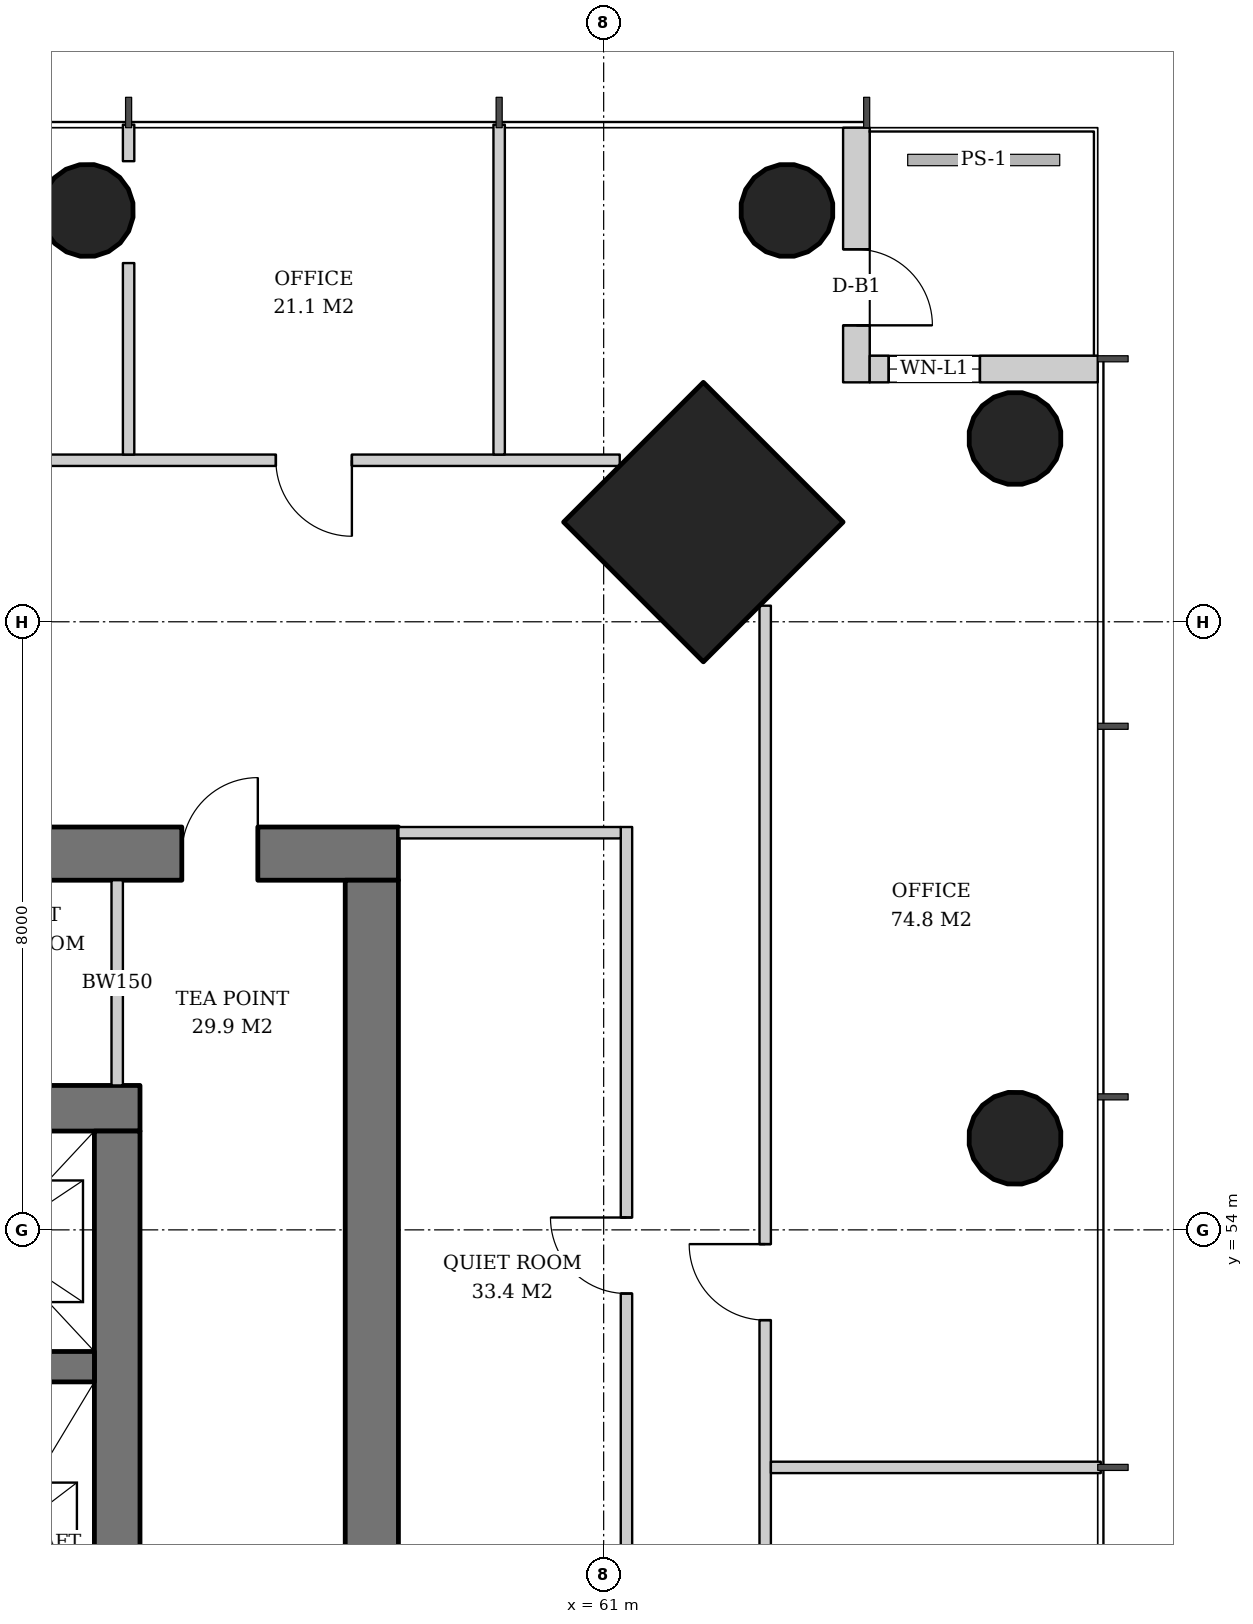
"""IFC4 building model, lengths in metres.
Left out: names, types, materials, properties, quantities, classifications, styles, units other than length and angle.
Written with IfcOpenShell. Run it as: python <this file> out.ifc"""

import sys

from ifc_helpers import new_model, si_unit, direction, frame, frame_2d, origin, origin_2d, place, context, subcontext, project, spatial, rectangle, hollow_circle, extrude, element, fill, save


model = new_model("IFC4")
c1 = context("Model", 3, precision=1e-05, world=origin(), true_north=direction((0.0, 1.0)))
c2 = subcontext(c1, "Body", "Model", "MODEL_VIEW")
j1 = project(units=[si_unit("LENGTHUNIT", "METRE"), si_unit("PLANEANGLEUNIT", "RADIAN")], contexts=[c1])
p1 = place(None, origin())
s1 = spatial("IfcSite", under=j1, at=p1, CompositionType="ELEMENT")
p2 = place(p1, origin())
s2 = spatial("IfcBuilding", under=s1, at=p2, CompositionType="ELEMENT")
p3 = place(p2, frame((0.0, 0.0, 100.8)))
s3 = spatial("IfcBuildingStorey", under=s2, at=p3, CompositionType="ELEMENT", Elevation=100.8)
p4 = place(p3, frame((62.35, 63.35, 0.0), z_axis=(-0.031962158256, -0.031962158256, 0.998977898093), x_axis=(0.707106781187, -0.707106781187, 0.0)))
e1 = element("IfcColumn", 1, at=p4, inside=s3, PredefinedType="COLUMN", context=c2, shape_type="SweptSolid", body=[
    extrude(rectangle(XDim=2.6, YDim=2.6, at=origin_2d()), origin(), (0.0, 0.0, 1.0), 3.804),
])
p5 = place(p3, frame((66.45, 64.45, 0.0), z_axis=(-0.031898107953, -0.031898107953, 0.998981992539), x_axis=(0.707106781187, -0.707106781187, 0.0)))
e2 = element("IfcColumn", 2, at=p5, inside=s3, PredefinedType="COLUMN", context=c2, shape_type="SweptSolid", body=[
    extrude(hollow_circle(Radius=0.61, WallThickness=0.04, at=origin_2d()), origin(), (0.0, 0.0, 1.0), 3.804),
])
p6 = place(p3, frame((66.45, 55.225, 0.0), z_axis=(-0.031910269556, -0.015987237665, 0.999362868496), x_axis=(0.447933021895, -0.894067115991, 0.0)))
e3 = element("IfcColumn", 3, at=p6, inside=s3, PredefinedType="COLUMN", context=c2, shape_type="SweptSolid", body=[
    extrude(hollow_circle(Radius=0.61, WallThickness=0.04, at=origin_2d()), origin(), (0.0, 0.0, 1.0), 3.802),
])
p7 = place(p3, frame((63.45, 67.45, 0.0), z_axis=(-0.031898107953, -0.031898107953, 0.998981992539), x_axis=(0.707106781187, -0.707106781187, 0.0)))
e4 = element("IfcColumn", 4, at=p7, inside=s3, PredefinedType="COLUMN", context=c2, shape_type="SweptSolid", body=[
    extrude(hollow_circle(Radius=0.61, WallThickness=0.04, at=origin_2d()), origin(), (0.0, 0.0, 1.0), 3.804),
])
p8 = place(p3, frame((54.225, 67.45, 0.0), z_axis=(-0.015987237665, -0.031910269556, 0.999362868496), x_axis=(0.894067115991, -0.447933021895, 0.0)))
e5 = element("IfcColumn", 5, at=p8, inside=s3, PredefinedType="COLUMN", context=c2, shape_type="SweptSolid", body=[
    extrude(hollow_circle(Radius=0.61, WallThickness=0.04, at=origin_2d()), origin(), (0.0, 0.0, 1.0), 3.802),
])
p9 = place(p3, frame((35.1, 55.6, 0.0), z_axis=(0.0, 0.0, 1.0), x_axis=(1.0, 0.0, 0.0)))
e6 = element("IfcWall", 6, at=p9, inside=s3, PredefinedType="SHEAR", context=c2, shape_type="SweptSolid", body=[
    extrude(rectangle(XDim=19.8, YDim=0.6, at=frame_2d((9.9, 0.0))), origin(), (0.0, 0.0, 1.0), 3.8),
])
p10 = place(p9, frame((14.54, 0.0, 0.0)))
e7 = element("IfcOpeningElement", 7, at=p10, cuts=e6, PredefinedType="OPENING", context=c2, shape_type="SweptSolid", body=[
    extrude(rectangle(XDim=1.0, YDim=2.1, at=frame_2d((0.5, 1.05))), frame((0.0, 0.31, 0.0), z_axis=(0.0, -1.0, 0.0), x_axis=(1.0, 0.0, 0.0)), (0.0, 0.0, 1.0), 0.62),
])
p11 = place(p9, frame((2.425, 0.0, 0.0)))
e8 = element("IfcOpeningElement", 8, at=p11, cuts=e6, PredefinedType="OPENING", context=c2, shape_type="SweptSolid", body=[
    extrude(rectangle(XDim=1.0, YDim=2.1, at=frame_2d((0.5, 1.05))), frame((0.0, 0.31, 0.0), z_axis=(0.0, -1.0, 0.0), x_axis=(1.0, 0.0, 0.0)), (0.0, 0.0, 1.0), 0.62),
])
p12 = place(p3, frame((54.6, 36.7, 0.0), z_axis=(0.0, 0.0, 1.0), x_axis=(0.0, 1.0, 0.0)))
e9 = element("IfcWall", 9, at=p12, inside=s3, PredefinedType="SHEAR", context=c2, shape_type="SweptSolid", body=[
    extrude(rectangle(XDim=18.6, YDim=0.6, at=frame_2d((9.3, 0.0))), origin(), (0.0, 0.0, 1.0), 3.8),
])
p13 = place(p12, frame((8.4, 0.0, 0.0)))
e10 = element("IfcOpeningElement", 10, at=p13, cuts=e9, PredefinedType="OPENING", context=c2, shape_type="SweptSolid", body=[
    extrude(rectangle(XDim=1.8, YDim=2.4, at=frame_2d((0.9, 1.2))), frame((0.0, 0.31, 0.0), z_axis=(0.0, -1.0, 0.0), x_axis=(1.0, 0.0, 0.0)), (0.0, 0.0, 1.0), 0.62),
])
p14 = place(p3, frame((31.7, 58.95, 0.0), z_axis=(0.0, 0.0, 1.0), x_axis=(1.0, 0.0, 0.0)))
e11 = element("IfcWall", 11, at=p14, inside=s3, PredefinedType="SHEAR", context=c2, shape_type="SweptSolid", body=[
    extrude(rectangle(XDim=26.6, YDim=0.7, at=frame_2d((13.3, 0.0))), origin(), (0.0, 0.0, 1.0), 3.8),
])
p15 = place(p14, frame((17.94, 0.0, 0.0)))
e12 = element("IfcOpeningElement", 12, at=p15, cuts=e11, PredefinedType="OPENING", context=c2, shape_type="SweptSolid", body=[
    extrude(rectangle(XDim=1.0, YDim=2.1, at=frame_2d((0.5, 1.05))), frame((0.0, 0.36, 0.0), z_axis=(0.0, -1.0, 0.0), x_axis=(1.0, 0.0, 0.0)), (0.0, 0.0, 1.0), 0.72),
])
p16 = place(p14, frame((5.825, 0.0, 0.0)))
e13 = element("IfcOpeningElement", 13, at=p16, cuts=e11, PredefinedType="OPENING", context=c2, shape_type="SweptSolid", body=[
    extrude(rectangle(XDim=1.0, YDim=2.1, at=frame_2d((0.5, 1.05))), frame((0.0, 0.36, 0.0), z_axis=(0.0, -1.0, 0.0), x_axis=(1.0, 0.0, 0.0)), (0.0, 0.0, 1.0), 0.72),
])
p17 = place(p14, frame((1.169, 0.0, 0.0)))
e14 = element("IfcOpeningElement", 14, at=p17, cuts=e11, PredefinedType="OPENING", context=c2, shape_type="SweptSolid", body=[
    extrude(rectangle(XDim=1.0, YDim=2.1, at=frame_2d((0.5, 1.05))), frame((0.0, 0.36, 0.0), z_axis=(0.0, -1.0, 0.0), x_axis=(1.0, 0.0, 0.0)), (0.0, 0.0, 1.0), 0.72),
])
p18 = place(p14, frame((3.447, 0.0, 0.0)))
e15 = element("IfcOpeningElement", 15, at=p18, cuts=e11, PredefinedType="OPENING", context=c2, shape_type="SweptSolid", body=[
    extrude(rectangle(XDim=1.0, YDim=2.1, at=frame_2d((0.5, 1.05))), frame((0.0, 0.36, 0.0), z_axis=(0.0, -1.0, 0.0), x_axis=(1.0, 0.0, 0.0)), (0.0, 0.0, 1.0), 0.72),
])
p19 = place(p14, frame((11.577, 0.0, 0.0)))
e16 = element("IfcOpeningElement", 16, at=p19, cuts=e11, PredefinedType="OPENING", context=c2, shape_type="SweptSolid", body=[
    extrude(rectangle(XDim=1.0, YDim=2.1, at=frame_2d((0.5, 1.05))), frame((0.0, 0.36, 0.0), z_axis=(0.0, -1.0, 0.0), x_axis=(1.0, 0.0, 0.0)), (0.0, 0.0, 1.0), 0.72),
])
p20 = place(p14, frame((20.9, 0.0, 0.0)))
e17 = element("IfcOpeningElement", 17, at=p20, cuts=e11, PredefinedType="OPENING", context=c2, shape_type="SweptSolid", body=[
    extrude(rectangle(XDim=1.0, YDim=2.1, at=frame_2d((0.5, 1.05))), frame((0.0, 0.36, 0.0), z_axis=(0.0, -1.0, 0.0), x_axis=(1.0, 0.0, 0.0)), (0.0, 0.0, 1.0), 0.72),
])
p21 = place(p14, frame((23.75, 0.0, 0.0)))
e18 = element("IfcOpeningElement", 18, at=p21, cuts=e11, PredefinedType="OPENING", context=c2, shape_type="SweptSolid", body=[
    extrude(rectangle(XDim=1.0, YDim=2.1, at=frame_2d((0.5, 1.05))), frame((0.0, 0.36, 0.0), z_axis=(0.0, -1.0, 0.0), x_axis=(1.0, 0.0, 0.0)), (0.0, 0.0, 1.0), 0.72),
])
p22 = place(p3, frame((57.95, 33.4, 0.0), z_axis=(0.0, 0.0, 1.0), x_axis=(0.0, 1.0, 0.0)))
e19 = element("IfcWall", 19, at=p22, inside=s3, PredefinedType="SHEAR", context=c2, shape_type="SweptSolid", body=[
    extrude(rectangle(XDim=25.2, YDim=0.7, at=frame_2d((12.6, 0.0))), origin(), (0.0, 0.0, 1.0), 3.8),
])
p23 = place(p22, frame((11.7, 0.0, 0.0)))
e20 = element("IfcOpeningElement", 20, at=p23, cuts=e19, PredefinedType="OPENING", context=c2, shape_type="SweptSolid", body=[
    extrude(rectangle(XDim=1.8, YDim=2.4, at=frame_2d((0.9, 1.2))), frame((0.0, 0.36, 0.0), z_axis=(0.0, -1.0, 0.0), x_axis=(1.0, 0.0, 0.0)), (0.0, 0.0, 1.0), 0.72),
])
p24 = place(p3, frame((35.7, 52.2, 0.0), z_axis=(0.0, 0.0, 1.0), x_axis=(1.0, 0.0, 0.0)))
e21 = element("IfcWall", 21, at=p24, inside=s3, PredefinedType="SHEAR", context=c2, shape_type="SweptSolid", body=[
    extrude(rectangle(XDim=18.6, YDim=0.4, at=frame_2d((9.3, 0.0))), origin(), (0.0, 0.0, 1.0), 3.8),
])
p25 = place(p3, frame((64.325, 68.5, 0.0), z_axis=(0.0, 0.0, 1.0), x_axis=(0.0, -1.0, 0.0)))
e22 = element("IfcWall", 22, at=p25, inside=s3, PredefinedType="SOLIDWALL", context=c2, shape_type="SweptSolid", body=[
    extrude(rectangle(XDim=3.35, YDim=0.35, at=frame_2d((1.675, 0.0))), origin(), (0.0, 0.0, 1.0), 3.62),
])
p26 = place(p25, frame((1.6, 0.0, 0.0)))
e23 = element("IfcOpeningElement", 23, at=p26, cuts=e22, PredefinedType="OPENING", context=c2, shape_type="SweptSolid", body=[
    extrude(rectangle(XDim=1.0, YDim=2.4, at=frame_2d((0.5, 1.2))), frame((0.0, 0.185, 0.0), z_axis=(0.0, -1.0, 0.0), x_axis=(1.0, 0.0, 0.0)), (0.0, 0.0, 1.0), 0.37),
])
p27 = place(p3, frame((64.5, 65.325, 0.0), z_axis=(0.0, 0.0, 1.0), x_axis=(1.0, 0.0, 0.0)))
e24 = element("IfcWall", 24, at=p27, inside=s3, PredefinedType="SOLIDWALL", context=c2, shape_type="SweptSolid", body=[
    extrude(rectangle(XDim=3.0, YDim=0.35, at=frame_2d((1.5, 0.0))), origin(), (0.0, 0.0, 1.0), 3.62),
])
p28 = place(p27, frame((0.25, 0.0, 0.6)))
e25 = element("IfcOpeningElement", 25, at=p28, cuts=e24, PredefinedType="OPENING", context=c2, shape_type="SweptSolid", body=[
    extrude(rectangle(XDim=1.2, YDim=2.55, at=frame_2d((0.6, 1.275))), frame((0.0, 0.185, 0.0), z_axis=(0.0, -1.0, 0.0), x_axis=(1.0, 0.0, 0.0)), (0.0, 0.0, 1.0), 0.37),
])
p29 = place(p3, frame((54.6, 55.9, 0.0), z_axis=(0.0, 0.0, 1.0), x_axis=(0.0, 1.0, 0.0)))
e26 = element("IfcWall", 26, at=p29, inside=s3, PredefinedType="SOLIDWALL", context=c2, shape_type="SweptSolid", body=[
    extrude(rectangle(XDim=2.7, YDim=0.15, at=frame_2d((1.35, 0.0))), origin(), (0.0, 0.0, 1.0), 3.62),
])
p30 = place(p3, frame((61.3, 48.025, 0.0), z_axis=(0.0, 0.0, 1.0), x_axis=(0.0, 1.0, 0.0)))
e27 = element("IfcWall", 27, at=p30, inside=s3, PredefinedType="PARTITIONING", context=c2, shape_type="SweptSolid", body=[
    extrude(rectangle(XDim=11.275, YDim=0.15, at=frame_2d((5.638, 0.0))), origin(), (0.0, 0.0, 1.0), 2.806),
])
p31 = place(p30, frame((5.137, 0.0, 0.0)))
e28 = element("IfcOpeningElement", 28, at=p31, cuts=e27, PredefinedType="OPENING", context=c2, shape_type="SweptSolid", body=[
    extrude(rectangle(XDim=1.0, YDim=2.1, at=frame_2d((0.5, 1.05))), frame((0.0, 0.085, 0.0), z_axis=(0.0, -1.0, 0.0), x_axis=(1.0, 0.0, 0.0)), (0.0, 0.0, 1.0), 0.17),
])
p32 = place(p3, frame((58.3, 59.225, 0.0), z_axis=(0.0, 0.0, 1.0), x_axis=(1.0, 0.0, 0.0)))
e29 = element("IfcWall", 29, at=p32, inside=s3, PredefinedType="PARTITIONING", context=c2, shape_type="SweptSolid", body=[
    extrude(rectangle(XDim=2.925, YDim=0.15, at=frame_2d((1.462, 0.0))), origin(), (0.0, 0.0, 1.0), 3.62),
])
p33 = place(p3, frame((63.125, 29.789, 0.0), z_axis=(0.0, 0.0, 1.0), x_axis=(0.0, 1.0, 0.0)))
e30 = element("IfcWall", 30, at=p33, inside=s3, PredefinedType="PARTITIONING", context=c2, shape_type="SweptSolid", body=[
    extrude(rectangle(XDim=32.423, YDim=0.15, at=frame_2d((16.211, 0.0))), origin(), (0.0, 0.0, 1.0), 2.72),
])
p34 = place(p33, frame((3.524, 0.0, 0.0)))
e31 = element("IfcOpeningElement", 31, at=p34, cuts=e30, PredefinedType="OPENING", context=c2, shape_type="SweptSolid", body=[
    extrude(rectangle(XDim=1.0, YDim=2.1, at=frame_2d((0.5, 1.05))), frame((0.0, 0.085, 0.0), z_axis=(0.0, -1.0, 0.0), x_axis=(1.0, 0.0, 0.0)), (0.0, 0.0, 1.0), 0.17),
])
p35 = place(p33, frame((8.399, 0.0, 0.0)))
e32 = element("IfcOpeningElement", 32, at=p35, cuts=e30, PredefinedType="OPENING", context=c2, shape_type="SweptSolid", body=[
    extrude(rectangle(XDim=1.0, YDim=2.1, at=frame_2d((0.5, 1.05))), frame((0.0, 0.085, 0.0), z_axis=(0.0, -1.0, 0.0), x_axis=(1.0, 0.0, 0.0)), (0.0, 0.0, 1.0), 0.17),
])
p36 = place(p33, frame((13.274, 0.0, 0.0)))
e33 = element("IfcOpeningElement", 33, at=p36, cuts=e30, PredefinedType="OPENING", context=c2, shape_type="SweptSolid", body=[
    extrude(rectangle(XDim=1.0, YDim=2.1, at=frame_2d((0.5, 1.05))), frame((0.0, 0.085, 0.0), z_axis=(0.0, -1.0, 0.0), x_axis=(1.0, 0.0, 0.0)), (0.0, 0.0, 1.0), 0.17),
])
p37 = place(p33, frame((18.149, 0.0, 0.0)))
e34 = element("IfcOpeningElement", 34, at=p37, cuts=e30, PredefinedType="OPENING", context=c2, shape_type="SweptSolid", body=[
    extrude(rectangle(XDim=1.0, YDim=2.1, at=frame_2d((0.5, 1.05))), frame((0.0, 0.085, 0.0), z_axis=(0.0, -1.0, 0.0), x_axis=(1.0, 0.0, 0.0)), (0.0, 0.0, 1.0), 0.17),
])
p38 = place(p33, frame((23.024, 0.0, 0.0)))
e35 = element("IfcOpeningElement", 35, at=p38, cuts=e30, PredefinedType="OPENING", context=c2, shape_type="SweptSolid", body=[
    extrude(rectangle(XDim=1.0, YDim=2.1, at=frame_2d((0.5, 1.05))), frame((0.0, 0.085, 0.0), z_axis=(0.0, -1.0, 0.0), x_axis=(1.0, 0.0, 0.0)), (0.0, 0.0, 1.0), 0.17),
])
p39 = place(p3, frame((63.2, 50.875, 0.0), z_axis=(0.0, 0.0, 1.0), x_axis=(1.0, 0.0, 0.0)))
e36 = element("IfcWall", 36, at=p39, inside=s3, PredefinedType="PARTITIONING", context=c2, shape_type="SweptSolid", body=[
    extrude(rectangle(XDim=4.34, YDim=0.15, at=frame_2d((2.17, 0.0))), origin(), (0.0, 0.0, 1.0), 2.82),
])
p40 = place(p3, frame((61.211, 64.125, 0.0), z_axis=(0.0, 0.0, 1.0), x_axis=(-1.0, 0.0, 0.0)))
e37 = element("IfcWall", 37, at=p40, inside=s3, PredefinedType="PARTITIONING", context=c2, shape_type="SweptSolid", body=[
    extrude(rectangle(XDim=32.423, YDim=0.15, at=frame_2d((16.211, 0.0))), origin(), (0.0, 0.0, 1.0), 2.72),
])
p41 = place(p40, frame((3.524, 0.0, 0.0)))
e38 = element("IfcOpeningElement", 38, at=p41, cuts=e37, PredefinedType="OPENING", context=c2, shape_type="SweptSolid", body=[
    extrude(rectangle(XDim=1.0, YDim=2.1, at=frame_2d((0.5, 1.05))), frame((0.0, 0.085, 0.0), z_axis=(0.0, -1.0, 0.0), x_axis=(1.0, 0.0, 0.0)), (0.0, 0.0, 1.0), 0.17),
])
p42 = place(p40, frame((8.399, 0.0, 0.0)))
e39 = element("IfcOpeningElement", 39, at=p42, cuts=e37, PredefinedType="OPENING", context=c2, shape_type="SweptSolid", body=[
    extrude(rectangle(XDim=1.0, YDim=2.1, at=frame_2d((0.5, 1.05))), frame((0.0, 0.085, 0.0), z_axis=(0.0, -1.0, 0.0), x_axis=(1.0, 0.0, 0.0)), (0.0, 0.0, 1.0), 0.17),
])
p43 = place(p40, frame((13.274, 0.0, 0.0)))
e40 = element("IfcOpeningElement", 40, at=p43, cuts=e37, PredefinedType="OPENING", context=c2, shape_type="SweptSolid", body=[
    extrude(rectangle(XDim=1.0, YDim=2.1, at=frame_2d((0.5, 1.05))), frame((0.0, 0.085, 0.0), z_axis=(0.0, -1.0, 0.0), x_axis=(1.0, 0.0, 0.0)), (0.0, 0.0, 1.0), 0.17),
])
p44 = place(p40, frame((18.149, 0.0, 0.0)))
e41 = element("IfcOpeningElement", 41, at=p44, cuts=e37, PredefinedType="OPENING", context=c2, shape_type="SweptSolid", body=[
    extrude(rectangle(XDim=1.0, YDim=2.1, at=frame_2d((0.5, 1.05))), frame((0.0, 0.085, 0.0), z_axis=(0.0, -1.0, 0.0), x_axis=(1.0, 0.0, 0.0)), (0.0, 0.0, 1.0), 0.17),
])
p45 = place(p40, frame((23.024, 0.0, 0.0)))
e42 = element("IfcOpeningElement", 42, at=p45, cuts=e37, PredefinedType="OPENING", context=c2, shape_type="SweptSolid", body=[
    extrude(rectangle(XDim=1.0, YDim=2.1, at=frame_2d((0.5, 1.05))), frame((0.0, 0.085, 0.0), z_axis=(0.0, -1.0, 0.0), x_axis=(1.0, 0.0, 0.0)), (0.0, 0.0, 1.0), 0.17),
])
p46 = place(p40, frame((27.899, 0.0, 0.0)))
e43 = element("IfcOpeningElement", 43, at=p46, cuts=e37, PredefinedType="OPENING", context=c2, shape_type="SweptSolid", body=[
    extrude(rectangle(XDim=1.0, YDim=2.1, at=frame_2d((0.5, 1.05))), frame((0.0, 0.085, 0.0), z_axis=(0.0, -1.0, 0.0), x_axis=(1.0, 0.0, 0.0)), (0.0, 0.0, 1.0), 0.17),
])
p47 = place(p3, frame((59.625, 64.2, 0.0), z_axis=(0.0, 0.0, 1.0), x_axis=(0.0, 1.0, 0.0)))
e44 = element("IfcWall", 44, at=p47, inside=s3, PredefinedType="PARTITIONING", context=c2, shape_type="SweptSolid", body=[
    extrude(rectangle(XDim=4.34, YDim=0.15, at=frame_2d((2.17, 0.0))), origin(), (0.0, 0.0, 1.0), 2.82),
])
p48 = place(p3, frame((54.75, 64.2, 0.0), z_axis=(0.0, 0.0, 1.0), x_axis=(0.0, 1.0, 0.0)))
e45 = element("IfcWall", 45, at=p48, inside=s3, PredefinedType="PARTITIONING", context=c2, shape_type="SweptSolid", body=[
    extrude(rectangle(XDim=2.519, YDim=0.15, at=frame_2d((1.26, 0.0))), origin(), (0.0, 0.0, 1.0), 3.62),
])
p49 = place(p3, frame((54.75, 68.06, 0.0), z_axis=(0.0, 0.0, 1.0), x_axis=(0.0, 1.0, 0.0)))
e46 = element("IfcWall", 46, at=p49, inside=s3, PredefinedType="PARTITIONING", context=c2, shape_type="SweptSolid", body=[
    extrude(rectangle(XDim=0.48, YDim=0.15, at=frame_2d((0.24, 0.0))), origin(), (0.0, 0.0, 1.0), 3.62),
])
p50 = place(p26, origin())
e47 = element("IfcDoor", 47, at=p50, inside=s3, OperationType="SINGLE_SWING_RIGHT", PredefinedType="DOOR", context=c2, shape_type="SweptSolid", body=[
    extrude(rectangle(XDim=1.0, YDim=2.4, at=frame_2d((0.5, 1.2))), frame((0.0, 0.025, 0.0), z_axis=(0.0, -1.0, 0.0), x_axis=(1.0, 0.0, 0.0)), (0.0, 0.0, 1.0), 0.05),
])
fill(e23, e47)
p51 = place(p28, origin())
e48 = element("IfcWindow", 48, at=p51, inside=s3, PartitioningType="SINGLE_PANEL", PredefinedType="WINDOW", context=c2, shape_type="SweptSolid", body=[
    extrude(rectangle(XDim=1.2, YDim=2.55, at=frame_2d((0.6, 1.275))), frame((0.0, 0.03, 0.0), z_axis=(0.0, -1.0, 0.0), x_axis=(1.0, 0.0, 0.0)), (0.0, 0.0, 1.0), 0.06),
])
fill(e25, e48)
p52 = place(p21, origin())
e49 = element("IfcDoor", 49, at=p52, inside=s3, OperationType="SINGLE_SWING_RIGHT", PredefinedType="DOOR", context=c2, shape_type="SweptSolid", body=[
    extrude(rectangle(XDim=1.0, YDim=2.1, at=frame_2d((0.5, 1.05))), frame((0.0, -0.29, 0.0), z_axis=(0.0, -1.0, 0.0), x_axis=(1.0, 0.0, 0.0)), (0.0, 0.0, 1.0), 0.05),
])
fill(e18, e49)
p53 = place(p31, origin())
e50 = element("IfcDoor", 50, at=p53, inside=s3, OperationType="SINGLE_SWING_RIGHT", PredefinedType="DOOR", context=c2, shape_type="SweptSolid", body=[
    extrude(rectangle(XDim=1.0, YDim=2.1, at=frame_2d((0.5, 1.05))), frame((0.0, 0.025, 0.0), z_axis=(0.0, -1.0, 0.0), x_axis=(1.0, 0.0, 0.0)), (0.0, 0.0, 1.0), 0.05),
])
fill(e28, e50)
p54 = place(p38, origin())
e51 = element("IfcDoor", 51, at=p54, inside=s3, OperationType="SINGLE_SWING_RIGHT", PredefinedType="DOOR", context=c2, shape_type="SweptSolid", body=[
    extrude(rectangle(XDim=1.0, YDim=2.1, at=frame_2d((0.5, 1.05))), frame((0.0, 0.025, 0.0), z_axis=(0.0, -1.0, 0.0), x_axis=(1.0, 0.0, 0.0)), (0.0, 0.0, 1.0), 0.05),
])
fill(e35, e51)
p55 = place(p41, origin())
e52 = element("IfcDoor", 52, at=p55, inside=s3, OperationType="SINGLE_SWING_LEFT", PredefinedType="DOOR", context=c2, shape_type="SweptSolid", body=[
    extrude(rectangle(XDim=1.0, YDim=2.1, at=frame_2d((0.5, 1.05))), frame((0.0, 0.025, 0.0), z_axis=(0.0, -1.0, 0.0), x_axis=(1.0, 0.0, 0.0)), (0.0, 0.0, 1.0), 0.05),
])
fill(e38, e52)
save(model, sys.argv[1])
